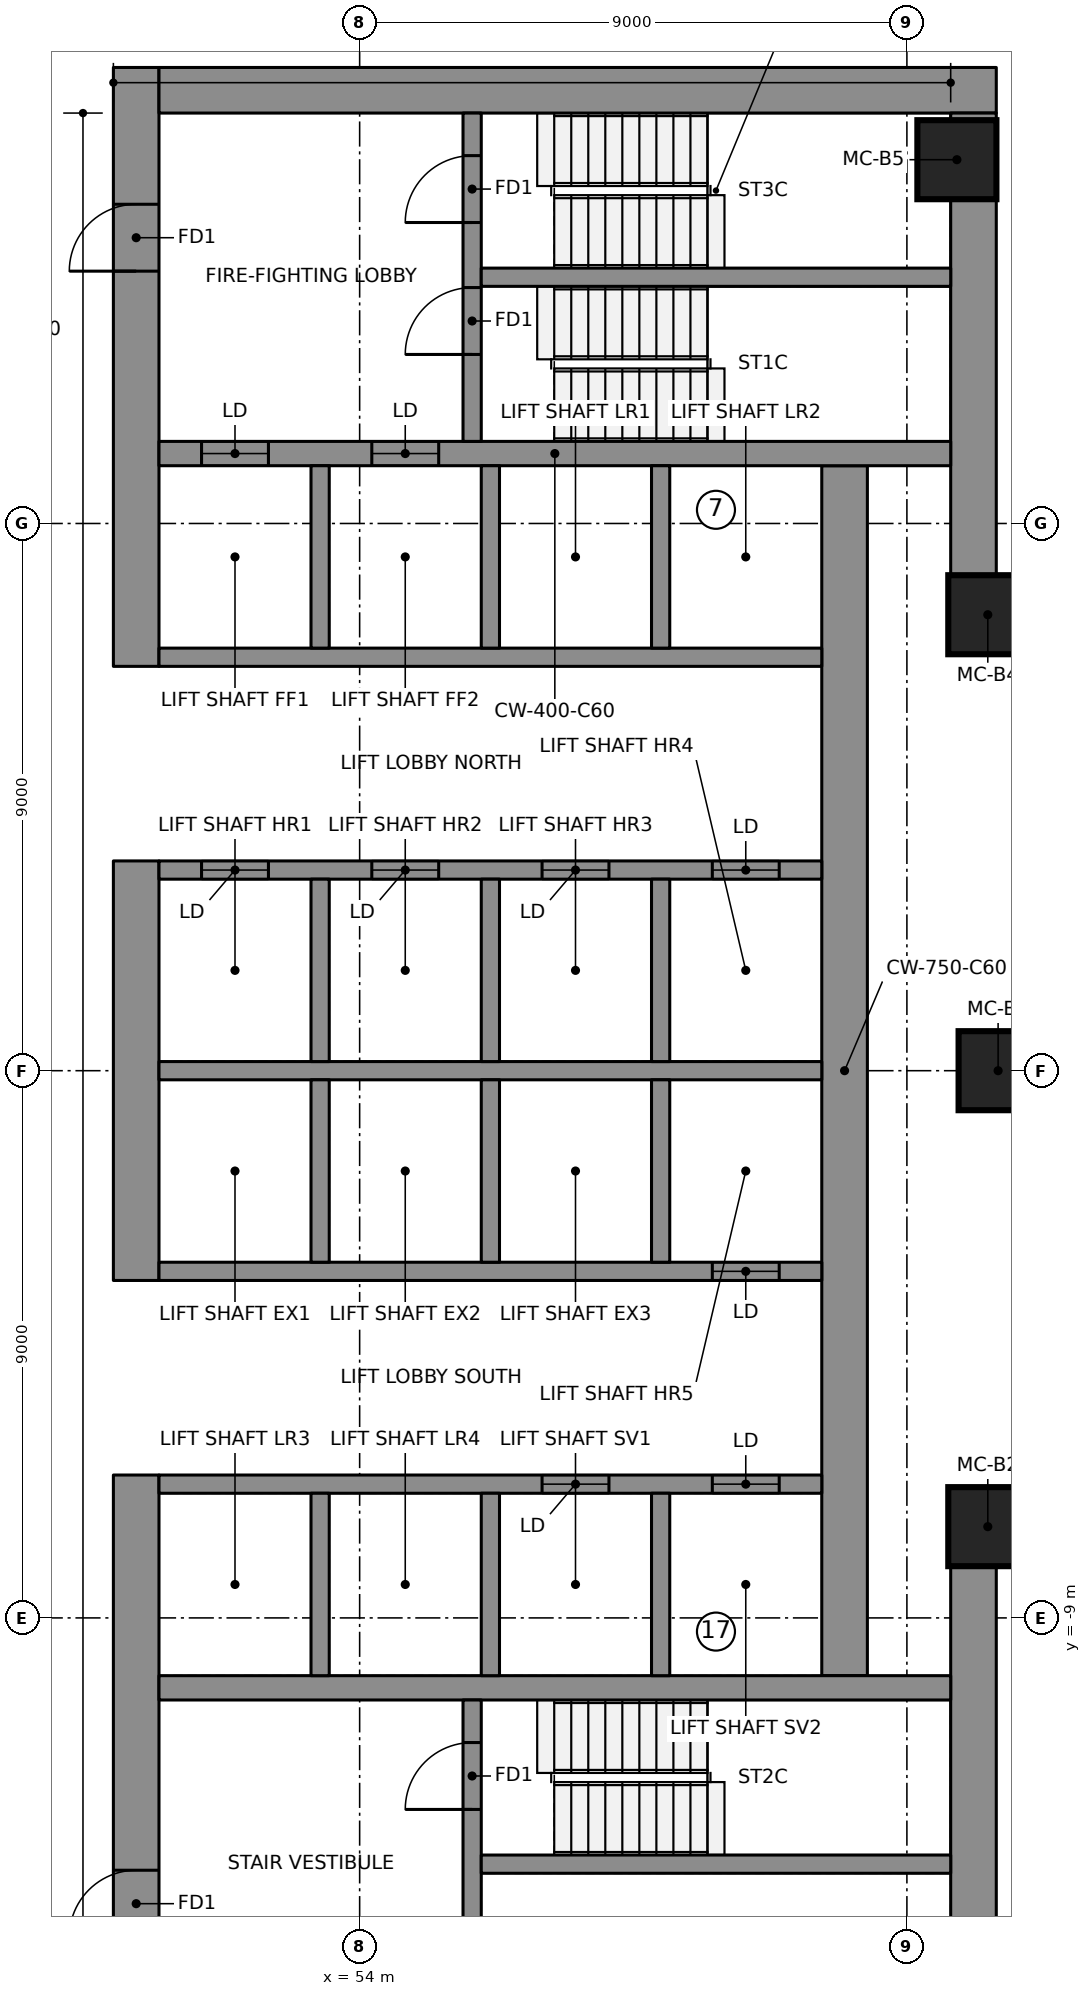
"""IFC4 building model, lengths in metres.
Left out: names, types, materials, properties, quantities, classifications, styles, units other than length and angle.
Written with IfcOpenShell. Run it as: python <this file> out.ifc"""

import sys

from ifc_helpers import new_model, si_unit, direction, frame, frame_2d, origin, origin_2d, place, context, subcontext, project, spatial, rectangle, extrude, element, fill, save


model = new_model("IFC4")
c1 = context("Model", 3, precision=1e-05, world=origin(), true_north=direction((0.0, 1.0)))
c2 = subcontext(c1, "Body", "Model", "MODEL_VIEW")
j1 = project(units=[si_unit("LENGTHUNIT", "METRE"), si_unit("PLANEANGLEUNIT", "RADIAN")], contexts=[c1])
p1 = place(None, origin())
s1 = spatial("IfcSite", under=j1, at=p1, CompositionType="ELEMENT")
p2 = place(p1, origin())
s2 = spatial("IfcBuilding", under=s1, at=p2, CompositionType="ELEMENT")
p3 = place(p2, frame((0.0, 0.0, 175.5)))
s3 = spatial("IfcBuildingStorey", under=s2, at=p3, CompositionType="ELEMENT", Elevation=175.5)
p4 = place(p3, frame((50.325, 6.65, 0.0), z_axis=(0.0, 0.0, 1.0), x_axis=(0.0, 1.0, 0.0)))
e1 = element("IfcWall", 1, at=p4, inside=s3, PredefinedType="SHEAR", context=c2, shape_type="SweptSolid", body=[
    extrude(rectangle(XDim=9.85, YDim=0.75, at=frame_2d((4.925, 0.0))), origin(), (0.0, 0.0, 1.0), 3.55),
])
p5 = place(p4, frame((6.5, 0.0, 0.0)))
e2 = element("IfcOpeningElement", 2, at=p5, cuts=e1, PredefinedType="OPENING", context=c2, shape_type="SweptSolid", body=[
    extrude(rectangle(XDim=1.1, YDim=2.1, at=frame_2d((0.55, 1.05))), frame((0.0, 0.385, 0.0), z_axis=(0.0, -1.0, 0.0), x_axis=(1.0, 0.0, 0.0)), (0.0, 0.0, 1.0), 0.77),
])
p6 = place(p3, frame((50.325, -3.45, 0.0), z_axis=(0.0, 0.0, 1.0), x_axis=(0.0, 1.0, 0.0)))
e3 = element("IfcWall", 3, at=p6, inside=s3, PredefinedType="SHEAR", context=c2, shape_type="SweptSolid", body=[
    extrude(rectangle(XDim=6.9, YDim=0.75, at=frame_2d((3.45, 0.0))), origin(), (0.0, 0.0, 1.0), 3.55),
])
p7 = place(p3, frame((50.325, -16.5, 0.0), z_axis=(0.0, 0.0, 1.0), x_axis=(0.0, 1.0, 0.0)))
e4 = element("IfcWall", 4, at=p7, inside=s3, PredefinedType="SHEAR", context=c2, shape_type="SweptSolid", body=[
    extrude(rectangle(XDim=9.85, YDim=0.75, at=frame_2d((4.925, 0.0))), origin(), (0.0, 0.0, 1.0), 3.55),
])
p8 = place(p7, frame((2.25, 0.0, 0.0)))
e5 = element("IfcOpeningElement", 5, at=p8, cuts=e4, PredefinedType="OPENING", context=c2, shape_type="SweptSolid", body=[
    extrude(rectangle(XDim=1.1, YDim=2.1, at=frame_2d((0.55, 1.05))), frame((0.0, 0.385, 0.0), z_axis=(0.0, -1.0, 0.0), x_axis=(1.0, 0.0, 0.0)), (0.0, 0.0, 1.0), 0.77),
])
p9 = place(p3, frame((50.7, 16.125, 0.0), z_axis=(0.0, 0.0, 1.0), x_axis=(1.0, 0.0, 0.0)))
e6 = element("IfcWall", 6, at=p9, inside=s3, PredefinedType="SHEAR", context=c2, shape_type="SweptSolid", body=[
    extrude(rectangle(XDim=13.77, YDim=0.75, at=frame_2d((6.885, 0.0))), origin(), (0.0, 0.0, 1.0), 3.55),
])
for number, where, z_axis, x_axis in (
    (7, (64.095, 8.099, 0.0), (0.0, 0.0, 1.0), (0.0, 1.0, 0.0)),
    (8, (64.095, -15.75, 0.0), (0.0, 0.0, 1.0), (0.0, 1.0, 0.0)),
):
    element("IfcWall", number, at=place(p3, frame(where, z_axis=z_axis, x_axis=x_axis)), inside=s3, PredefinedType="SHEAR", context=c2, shape_type="SweptSolid", body=[
        extrude(rectangle(XDim=7.651, YDim=0.75, at=frame_2d((3.825, 0.0))), origin(), (0.0, 0.0, 1.0), 3.55),
    ])
p10 = place(p3, frame((61.975, -9.95, 0.0), z_axis=(0.0, 0.0, 1.0), x_axis=(0.0, 1.0, 0.0)))
e9 = element("IfcWall", 9, at=p10, inside=s3, PredefinedType="SHEAR", context=c2, shape_type="SweptSolid", body=[
    extrude(rectangle(XDim=19.9, YDim=0.75, at=frame_2d((9.95, 0.0))), origin(), (0.0, 0.0, 1.0), 3.55),
])
p11 = place(p3, frame((50.7, 10.15, 0.0), z_axis=(0.0, 0.0, 1.0), x_axis=(1.0, 0.0, 0.0)))
e10 = element("IfcWall", 10, at=p11, inside=s3, PredefinedType="SHEAR", context=c2, shape_type="SweptSolid", body=[
    extrude(rectangle(XDim=13.02, YDim=0.4, at=frame_2d((6.51, 0.0))), origin(), (0.0, 0.0, 1.0), 3.55),
])
p12 = place(p11, frame((0.7, 0.0, 0.0)))
e11 = element("IfcOpeningElement", 11, at=p12, cuts=e10, PredefinedType="OPENING", context=c2, shape_type="SweptSolid", body=[
    extrude(rectangle(XDim=1.1, YDim=2.1, at=frame_2d((0.55, 1.05))), frame((0.0, 0.21, 0.0), z_axis=(0.0, -1.0, 0.0), x_axis=(1.0, 0.0, 0.0)), (0.0, 0.0, 1.0), 0.42),
])
p13 = place(p11, frame((3.5, 0.0, 0.0)))
e12 = element("IfcOpeningElement", 12, at=p13, cuts=e10, PredefinedType="OPENING", context=c2, shape_type="SweptSolid", body=[
    extrude(rectangle(XDim=1.1, YDim=2.1, at=frame_2d((0.55, 1.05))), frame((0.0, 0.21, 0.0), z_axis=(0.0, -1.0, 0.0), x_axis=(1.0, 0.0, 0.0)), (0.0, 0.0, 1.0), 0.42),
])
p14 = place(p3, frame((50.7, -10.15, 0.0), z_axis=(0.0, 0.0, 1.0), x_axis=(1.0, 0.0, 0.0)))
e13 = element("IfcWall", 13, at=p14, inside=s3, PredefinedType="SHEAR", context=c2, shape_type="SweptSolid", body=[
    extrude(rectangle(XDim=13.02, YDim=0.4, at=frame_2d((6.51, 0.0))), origin(), (0.0, 0.0, 1.0), 3.55),
])
p15 = place(p3, frame((50.7, 0.0, 0.0), z_axis=(0.0, 0.0, 1.0), x_axis=(1.0, 0.0, 0.0)))
e14 = element("IfcWall", 14, at=p15, inside=s3, PredefinedType="SHEAR", context=c2, shape_type="SweptSolid", body=[
    extrude(rectangle(XDim=10.9, YDim=0.3, at=frame_2d((5.45, 0.0))), origin(), (0.0, 0.0, 1.0), 3.55),
])
p16 = place(p3, frame((50.7, 3.3, 0.0), z_axis=(0.0, 0.0, 1.0), x_axis=(1.0, 0.0, 0.0)))
e15 = element("IfcWall", 15, at=p16, inside=s3, PredefinedType="SHEAR", context=c2, shape_type="SweptSolid", body=[
    extrude(rectangle(XDim=10.9, YDim=0.3, at=frame_2d((5.45, 0.0))), origin(), (0.0, 0.0, 1.0), 3.55),
])
p17 = place(p16, frame((0.7, 0.0, 0.0)))
e16 = element("IfcOpeningElement", 16, at=p17, cuts=e15, PredefinedType="OPENING", context=c2, shape_type="SweptSolid", body=[
    extrude(rectangle(XDim=1.1, YDim=2.1, at=frame_2d((0.55, 1.05))), frame((0.0, 0.16, 0.0), z_axis=(0.0, -1.0, 0.0), x_axis=(1.0, 0.0, 0.0)), (0.0, 0.0, 1.0), 0.32),
])
p18 = place(p16, frame((3.5, 0.0, 0.0)))
e17 = element("IfcOpeningElement", 17, at=p18, cuts=e15, PredefinedType="OPENING", context=c2, shape_type="SweptSolid", body=[
    extrude(rectangle(XDim=1.1, YDim=2.1, at=frame_2d((0.55, 1.05))), frame((0.0, 0.16, 0.0), z_axis=(0.0, -1.0, 0.0), x_axis=(1.0, 0.0, 0.0)), (0.0, 0.0, 1.0), 0.32),
])
p19 = place(p16, frame((6.3, 0.0, 0.0)))
e18 = element("IfcOpeningElement", 18, at=p19, cuts=e15, PredefinedType="OPENING", context=c2, shape_type="SweptSolid", body=[
    extrude(rectangle(XDim=1.1, YDim=2.1, at=frame_2d((0.55, 1.05))), frame((0.0, 0.16, 0.0), z_axis=(0.0, -1.0, 0.0), x_axis=(1.0, 0.0, 0.0)), (0.0, 0.0, 1.0), 0.32),
])
p20 = place(p16, frame((9.1, 0.0, 0.0)))
e19 = element("IfcOpeningElement", 19, at=p20, cuts=e15, PredefinedType="OPENING", context=c2, shape_type="SweptSolid", body=[
    extrude(rectangle(XDim=1.1, YDim=2.1, at=frame_2d((0.55, 1.05))), frame((0.0, 0.16, 0.0), z_axis=(0.0, -1.0, 0.0), x_axis=(1.0, 0.0, 0.0)), (0.0, 0.0, 1.0), 0.32),
])
p21 = place(p3, frame((50.7, 6.8, 0.0), z_axis=(0.0, 0.0, 1.0), x_axis=(1.0, 0.0, 0.0)))
e20 = element("IfcWall", 20, at=p21, inside=s3, PredefinedType="SHEAR", context=c2, shape_type="SweptSolid", body=[
    extrude(rectangle(XDim=10.9, YDim=0.3, at=frame_2d((5.45, 0.0))), origin(), (0.0, 0.0, 1.0), 3.55),
])
for number, where, z_axis, x_axis in (
    (21, (53.35, 0.15, 0.0), (0.0, 0.0, 1.0), (0.0, 1.0, 0.0)),
    (22, (53.35, 6.95, 0.0), (0.0, 0.0, 1.0), (0.0, 1.0, 0.0)),
    (23, (56.15, 0.15, 0.0), (0.0, 0.0, 1.0), (0.0, 1.0, 0.0)),
    (24, (56.15, 6.95, 0.0), (0.0, 0.0, 1.0), (0.0, 1.0, 0.0)),
    (25, (58.95, 0.15, 0.0), (0.0, 0.0, 1.0), (0.0, 1.0, 0.0)),
    (26, (58.95, 6.95, 0.0), (0.0, 0.0, 1.0), (0.0, 1.0, 0.0)),
):
    element("IfcWall", number, at=place(p3, frame(where, z_axis=z_axis, x_axis=x_axis)), inside=s3, PredefinedType="SHEAR", context=c2, shape_type="SweptSolid", body=[
        extrude(rectangle(XDim=3.0, YDim=0.3, at=frame_2d((1.5, 0.0))), origin(), (0.0, 0.0, 1.0), 3.55),
    ])
p22 = place(p3, frame((50.7, -3.3, 0.0), z_axis=(0.0, 0.0, 1.0), x_axis=(1.0, 0.0, 0.0)))
e27 = element("IfcWall", 27, at=p22, inside=s3, PredefinedType="SHEAR", context=c2, shape_type="SweptSolid", body=[
    extrude(rectangle(XDim=10.9, YDim=0.3, at=frame_2d((5.45, 0.0))), origin(), (0.0, 0.0, 1.0), 3.55),
])
p23 = place(p22, frame((9.1, 0.0, 0.0)))
e28 = element("IfcOpeningElement", 28, at=p23, cuts=e27, PredefinedType="OPENING", context=c2, shape_type="SweptSolid", body=[
    extrude(rectangle(XDim=1.1, YDim=2.1, at=frame_2d((0.55, 1.05))), frame((0.0, 0.16, 0.0), z_axis=(0.0, -1.0, 0.0), x_axis=(1.0, 0.0, 0.0)), (0.0, 0.0, 1.0), 0.32),
])
p24 = place(p3, frame((50.7, -6.8, 0.0), z_axis=(0.0, 0.0, 1.0), x_axis=(1.0, 0.0, 0.0)))
e29 = element("IfcWall", 29, at=p24, inside=s3, PredefinedType="SHEAR", context=c2, shape_type="SweptSolid", body=[
    extrude(rectangle(XDim=10.9, YDim=0.3, at=frame_2d((5.45, 0.0))), origin(), (0.0, 0.0, 1.0), 3.55),
])
p25 = place(p24, frame((6.3, 0.0, 0.0)))
e30 = element("IfcOpeningElement", 30, at=p25, cuts=e29, PredefinedType="OPENING", context=c2, shape_type="SweptSolid", body=[
    extrude(rectangle(XDim=1.1, YDim=2.1, at=frame_2d((0.55, 1.05))), frame((0.0, 0.16, 0.0), z_axis=(0.0, -1.0, 0.0), x_axis=(1.0, 0.0, 0.0)), (0.0, 0.0, 1.0), 0.32),
])
p26 = place(p24, frame((9.1, 0.0, 0.0)))
e31 = element("IfcOpeningElement", 31, at=p26, cuts=e29, PredefinedType="OPENING", context=c2, shape_type="SweptSolid", body=[
    extrude(rectangle(XDim=1.1, YDim=2.1, at=frame_2d((0.55, 1.05))), frame((0.0, 0.16, 0.0), z_axis=(0.0, -1.0, 0.0), x_axis=(1.0, 0.0, 0.0)), (0.0, 0.0, 1.0), 0.32),
])
for number, where, z_axis, x_axis in (
    (32, (53.35, -3.15, 0.0), (0.0, 0.0, 1.0), (0.0, 1.0, 0.0)),
    (33, (53.35, -9.95, 0.0), (0.0, 0.0, 1.0), (0.0, 1.0, 0.0)),
    (34, (56.15, -3.15, 0.0), (0.0, 0.0, 1.0), (0.0, 1.0, 0.0)),
    (35, (56.15, -9.95, 0.0), (0.0, 0.0, 1.0), (0.0, 1.0, 0.0)),
    (36, (58.95, -3.15, 0.0), (0.0, 0.0, 1.0), (0.0, 1.0, 0.0)),
    (37, (58.95, -9.95, 0.0), (0.0, 0.0, 1.0), (0.0, 1.0, 0.0)),
):
    element("IfcWall", number, at=place(p3, frame(where, z_axis=z_axis, x_axis=x_axis)), inside=s3, PredefinedType="SHEAR", context=c2, shape_type="SweptSolid", body=[
        extrude(rectangle(XDim=3.0, YDim=0.3, at=frame_2d((1.5, 0.0))), origin(), (0.0, 0.0, 1.0), 3.55),
    ])
p27 = place(p3, frame((55.85, 10.35, 0.0), z_axis=(0.0, 0.0, 1.0), x_axis=(0.0, 1.0, 0.0)))
e38 = element("IfcWall", 38, at=p27, inside=s3, PredefinedType="SHEAR", context=c2, shape_type="SweptSolid", body=[
    extrude(rectangle(XDim=5.4, YDim=0.3, at=frame_2d((2.7, 0.0))), origin(), (0.0, 0.0, 1.0), 3.55),
])
p28 = place(p27, frame((1.43, 0.0, 0.0)))
e39 = element("IfcOpeningElement", 39, at=p28, cuts=e38, PredefinedType="OPENING", context=c2, shape_type="SweptSolid", body=[
    extrude(rectangle(XDim=1.1, YDim=2.1, at=frame_2d((0.55, 1.05))), frame((0.0, 0.16, 0.0), z_axis=(0.0, -1.0, 0.0), x_axis=(1.0, 0.0, 0.0)), (0.0, 0.0, 1.0), 0.32),
])
p29 = place(p27, frame((3.6, 0.0, 0.0)))
e40 = element("IfcOpeningElement", 40, at=p29, cuts=e38, PredefinedType="OPENING", context=c2, shape_type="SweptSolid", body=[
    extrude(rectangle(XDim=1.1, YDim=2.1, at=frame_2d((0.55, 1.05))), frame((0.0, 0.16, 0.0), z_axis=(0.0, -1.0, 0.0), x_axis=(1.0, 0.0, 0.0)), (0.0, 0.0, 1.0), 0.32),
])
p30 = place(p3, frame((55.85, -15.75, 0.0), z_axis=(0.0, 0.0, 1.0), x_axis=(0.0, 1.0, 0.0)))
e41 = element("IfcWall", 41, at=p30, inside=s3, PredefinedType="SHEAR", context=c2, shape_type="SweptSolid", body=[
    extrude(rectangle(XDim=5.4, YDim=0.3, at=frame_2d((2.7, 0.0))), origin(), (0.0, 0.0, 1.0), 3.55),
])
p31 = place(p30, frame((3.6, 0.0, 0.0)))
e42 = element("IfcOpeningElement", 42, at=p31, cuts=e41, PredefinedType="OPENING", context=c2, shape_type="SweptSolid", body=[
    extrude(rectangle(XDim=1.1, YDim=2.1, at=frame_2d((0.55, 1.05))), frame((0.0, 0.16, 0.0), z_axis=(0.0, -1.0, 0.0), x_axis=(1.0, 0.0, 0.0)), (0.0, 0.0, 1.0), 0.32),
])
p32 = place(p30, frame((0.8, 0.0, 0.0)))
e43 = element("IfcOpeningElement", 43, at=p32, cuts=e41, PredefinedType="OPENING", context=c2, shape_type="SweptSolid", body=[
    extrude(rectangle(XDim=0.9, YDim=2.1, at=frame_2d((0.45, 1.05))), frame((0.0, 0.16, 0.0), z_axis=(0.0, -1.0, 0.0), x_axis=(1.0, 0.0, 0.0)), (0.0, 0.0, 1.0), 0.32),
])
for number, where, z_axis, x_axis in (
    (44, (56.0, 13.05, 0.0), (0.0, 0.0, 1.0), (1.0, 0.0, 0.0)),
    (45, (56.0, -13.05, 0.0), (0.0, 0.0, 1.0), (1.0, 0.0, 0.0)),
):
    element("IfcWall", number, at=place(p3, frame(where, z_axis=z_axis, x_axis=x_axis)), inside=s3, PredefinedType="SHEAR", context=c2, shape_type="SweptSolid", body=[
        extrude(rectangle(XDim=7.72, YDim=0.3, at=frame_2d((3.86, 0.0))), origin(), (0.0, 0.0, 1.0), 3.55),
    ])
for number, where, z_axis, x_axis in (
    (46, (64.33, -7.499, 0.0), (0.0, 0.0, 1.0), (1.0, 0.0, 0.0)),
    (47, (64.5, 0.0, 0.0), (0.0, 0.0, 1.0), (1.0, 0.0, 0.0)),
    (48, (64.33, 7.499, 0.0), (0.0, 0.0, 1.0), (1.0, 0.0, 0.0)),
    (49, (63.822, 14.983, 0.0), (0.0, 0.0, 1.0), (1.0, 0.0, 0.0)),
):
    element("IfcColumn", number, at=place(p3, frame(where, z_axis=z_axis, x_axis=x_axis)), inside=s3, PredefinedType="COLUMN", context=c2, shape_type="SweptSolid", body=[
        extrude(rectangle(XDim=1.3, YDim=1.3, at=origin_2d()), origin(), (0.0, 0.0, 1.0), 3.55),
    ])
p33 = place(p12, origin())
e50 = element("IfcDoor", 50, at=p33, inside=s3, OperationType="DOUBLE_DOOR_SLIDING", PredefinedType="DOOR", context=c2, shape_type="SweptSolid", body=[
    extrude(rectangle(XDim=1.1, YDim=2.1, at=frame_2d((0.55, 1.05))), frame((0.0, 0.025, 0.0), z_axis=(0.0, -1.0, 0.0), x_axis=(1.0, 0.0, 0.0)), (0.0, 0.0, 1.0), 0.05),
])
fill(e11, e50)
p34 = place(p13, origin())
e51 = element("IfcDoor", 51, at=p34, inside=s3, OperationType="DOUBLE_DOOR_SLIDING", PredefinedType="DOOR", context=c2, shape_type="SweptSolid", body=[
    extrude(rectangle(XDim=1.1, YDim=2.1, at=frame_2d((0.55, 1.05))), frame((0.0, 0.025, 0.0), z_axis=(0.0, -1.0, 0.0), x_axis=(1.0, 0.0, 0.0)), (0.0, 0.0, 1.0), 0.05),
])
fill(e12, e51)
p35 = place(p17, origin())
e52 = element("IfcDoor", 52, at=p35, inside=s3, OperationType="DOUBLE_DOOR_SLIDING", PredefinedType="DOOR", context=c2, shape_type="SweptSolid", body=[
    extrude(rectangle(XDim=1.1, YDim=2.1, at=frame_2d((0.55, 1.05))), frame((0.0, 0.025, 0.0), z_axis=(0.0, -1.0, 0.0), x_axis=(1.0, 0.0, 0.0)), (0.0, 0.0, 1.0), 0.05),
])
fill(e16, e52)
p36 = place(p18, origin())
e53 = element("IfcDoor", 53, at=p36, inside=s3, OperationType="DOUBLE_DOOR_SLIDING", PredefinedType="DOOR", context=c2, shape_type="SweptSolid", body=[
    extrude(rectangle(XDim=1.1, YDim=2.1, at=frame_2d((0.55, 1.05))), frame((0.0, 0.025, 0.0), z_axis=(0.0, -1.0, 0.0), x_axis=(1.0, 0.0, 0.0)), (0.0, 0.0, 1.0), 0.05),
])
fill(e17, e53)
p37 = place(p19, origin())
e54 = element("IfcDoor", 54, at=p37, inside=s3, OperationType="DOUBLE_DOOR_SLIDING", PredefinedType="DOOR", context=c2, shape_type="SweptSolid", body=[
    extrude(rectangle(XDim=1.1, YDim=2.1, at=frame_2d((0.55, 1.05))), frame((0.0, 0.025, 0.0), z_axis=(0.0, -1.0, 0.0), x_axis=(1.0, 0.0, 0.0)), (0.0, 0.0, 1.0), 0.05),
])
fill(e18, e54)
p38 = place(p20, origin())
e55 = element("IfcDoor", 55, at=p38, inside=s3, OperationType="DOUBLE_DOOR_SLIDING", PredefinedType="DOOR", context=c2, shape_type="SweptSolid", body=[
    extrude(rectangle(XDim=1.1, YDim=2.1, at=frame_2d((0.55, 1.05))), frame((0.0, 0.025, 0.0), z_axis=(0.0, -1.0, 0.0), x_axis=(1.0, 0.0, 0.0)), (0.0, 0.0, 1.0), 0.05),
])
fill(e19, e55)
p39 = place(p23, origin())
e56 = element("IfcDoor", 56, at=p39, inside=s3, OperationType="DOUBLE_DOOR_SLIDING", PredefinedType="DOOR", context=c2, shape_type="SweptSolid", body=[
    extrude(rectangle(XDim=1.1, YDim=2.1, at=frame_2d((0.55, 1.05))), frame((0.0, 0.025, 0.0), z_axis=(0.0, -1.0, 0.0), x_axis=(1.0, 0.0, 0.0)), (0.0, 0.0, 1.0), 0.05),
])
fill(e28, e56)
p40 = place(p25, origin())
e57 = element("IfcDoor", 57, at=p40, inside=s3, OperationType="DOUBLE_DOOR_SLIDING", PredefinedType="DOOR", context=c2, shape_type="SweptSolid", body=[
    extrude(rectangle(XDim=1.1, YDim=2.1, at=frame_2d((0.55, 1.05))), frame((0.0, 0.025, 0.0), z_axis=(0.0, -1.0, 0.0), x_axis=(1.0, 0.0, 0.0)), (0.0, 0.0, 1.0), 0.05),
])
fill(e30, e57)
p41 = place(p26, origin())
e58 = element("IfcDoor", 58, at=p41, inside=s3, OperationType="DOUBLE_DOOR_SLIDING", PredefinedType="DOOR", context=c2, shape_type="SweptSolid", body=[
    extrude(rectangle(XDim=1.1, YDim=2.1, at=frame_2d((0.55, 1.05))), frame((0.0, 0.025, 0.0), z_axis=(0.0, -1.0, 0.0), x_axis=(1.0, 0.0, 0.0)), (0.0, 0.0, 1.0), 0.05),
])
fill(e31, e58)
p42 = place(p28, origin())
e59 = element("IfcDoor", 59, at=p42, inside=s3, OperationType="SINGLE_SWING_RIGHT", PredefinedType="DOOR", context=c2, shape_type="SweptSolid", body=[
    extrude(rectangle(XDim=1.1, YDim=2.1, at=frame_2d((0.55, 1.05))), frame((0.0, 0.025, 0.0), z_axis=(0.0, -1.0, 0.0), x_axis=(1.0, 0.0, 0.0)), (0.0, 0.0, 1.0), 0.05),
])
fill(e39, e59)
p43 = place(p29, origin())
e60 = element("IfcDoor", 60, at=p43, inside=s3, OperationType="SINGLE_SWING_RIGHT", PredefinedType="DOOR", context=c2, shape_type="SweptSolid", body=[
    extrude(rectangle(XDim=1.1, YDim=2.1, at=frame_2d((0.55, 1.05))), frame((0.0, 0.025, 0.0), z_axis=(0.0, -1.0, 0.0), x_axis=(1.0, 0.0, 0.0)), (0.0, 0.0, 1.0), 0.05),
])
fill(e40, e60)
p44 = place(p31, origin())
e61 = element("IfcDoor", 61, at=p44, inside=s3, OperationType="SINGLE_SWING_RIGHT", PredefinedType="DOOR", context=c2, shape_type="SweptSolid", body=[
    extrude(rectangle(XDim=1.1, YDim=2.1, at=frame_2d((0.55, 1.05))), frame((0.0, 0.025, 0.0), z_axis=(0.0, -1.0, 0.0), x_axis=(1.0, 0.0, 0.0)), (0.0, 0.0, 1.0), 0.05),
])
fill(e42, e61)
p45 = place(p5, origin())
e62 = element("IfcDoor", 62, at=p45, inside=s3, OperationType="SINGLE_SWING_RIGHT", PredefinedType="DOOR", context=c2, shape_type="SweptSolid", body=[
    extrude(rectangle(XDim=1.1, YDim=2.1, at=frame_2d((0.55, 1.05))), frame((0.0, 0.025, 0.0), z_axis=(0.0, -1.0, 0.0), x_axis=(1.0, 0.0, 0.0)), (0.0, 0.0, 1.0), 0.05),
])
fill(e2, e62)
p46 = place(p8, origin())
e63 = element("IfcDoor", 63, at=p46, inside=s3, OperationType="SINGLE_SWING_RIGHT", PredefinedType="DOOR", context=c2, shape_type="SweptSolid", body=[
    extrude(rectangle(XDim=1.1, YDim=2.1, at=frame_2d((0.55, 1.05))), frame((0.0, 0.025, 0.0), z_axis=(0.0, -1.0, 0.0), x_axis=(1.0, 0.0, 0.0)), (0.0, 0.0, 1.0), 0.05),
])
fill(e5, e63)
save(model, sys.argv[1])
